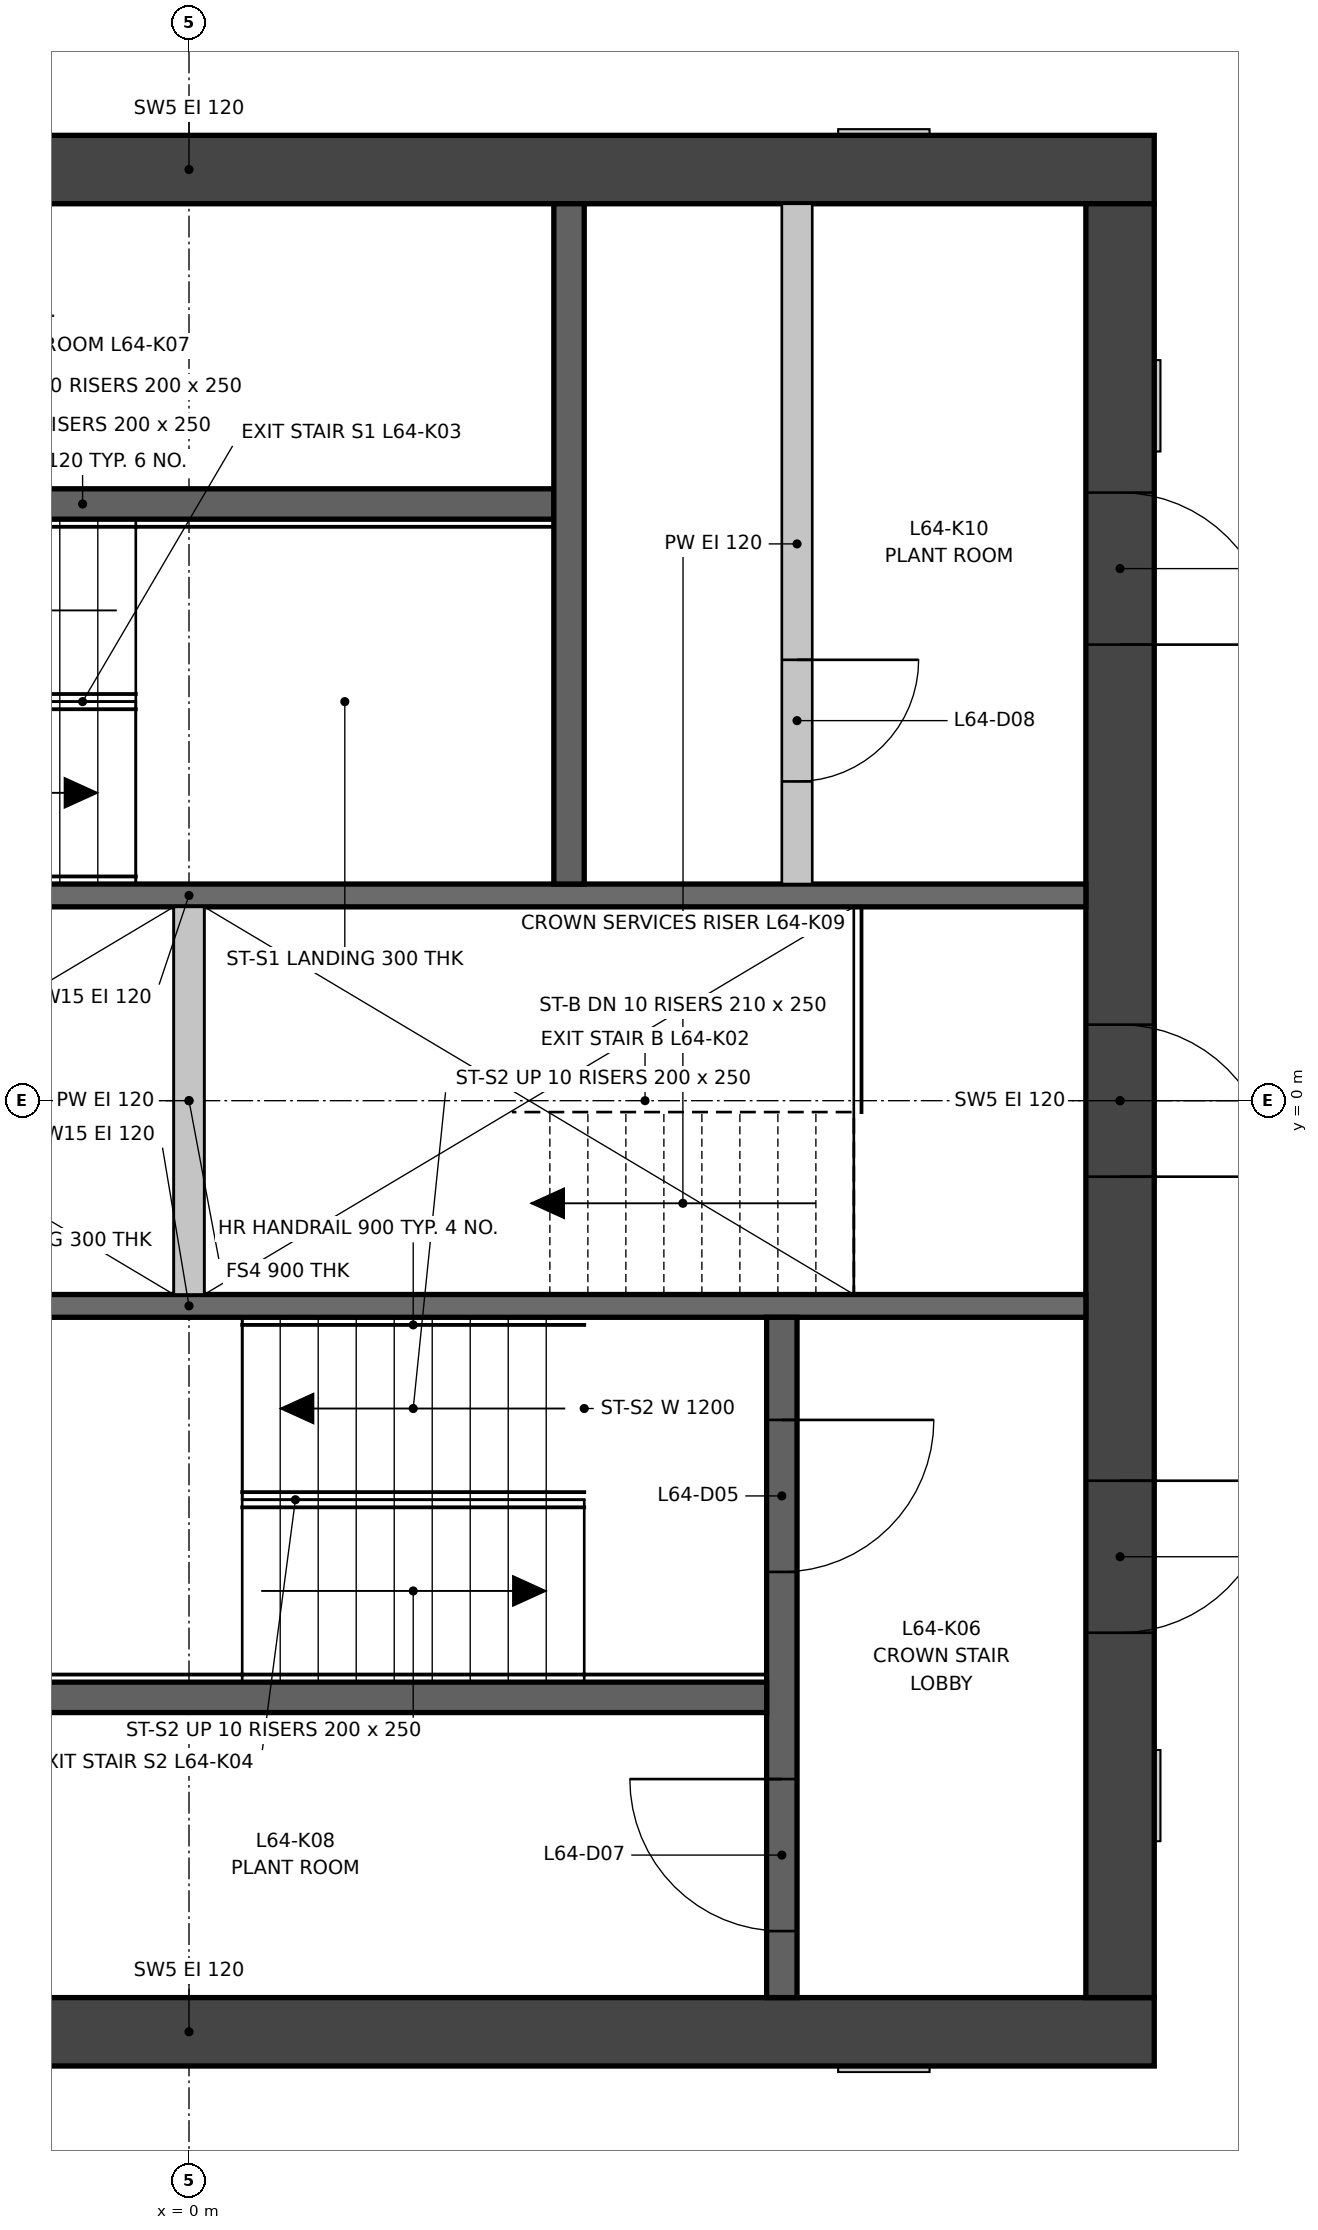
"""IFC4 building model, lengths in metres.
Left out: names, types, materials, properties, quantities, classifications, styles, units other than length and angle.
Written with IfcOpenShell. Run it as: python <this file> out.ifc"""

import sys

from ifc_helpers import new_model, si_unit, direction, frame, frame_2d, origin, place, context, subcontext, project, spatial, rectangle, extrude, element, fill, save


model = new_model("IFC4")
c1 = context("Model", 3, precision=1e-05, world=origin(), true_north=direction((0.0, 1.0)))
c2 = subcontext(c1, "Body", "Model", "MODEL_VIEW")
j1 = project(units=[si_unit("LENGTHUNIT", "METRE"), si_unit("PLANEANGLEUNIT", "RADIAN")], contexts=[c1])
p1 = place(None, origin())
s1 = spatial("IfcSite", under=j1, at=p1, CompositionType="ELEMENT")
p2 = place(p1, origin())
s2 = spatial("IfcBuilding", under=s1, at=p2, CompositionType="ELEMENT")
p3 = place(p2, frame((0.0, 0.0, 235.4)))
s3 = spatial("IfcBuildingStorey", under=s2, at=p3, CompositionType="ELEMENT", Elevation=235.4)
for number, where, z_axis, x_axis in (
    (1, (-6.35, -6.125, 0.0), (0.0, 0.0, 1.0), (1.0, 0.0, 0.0)),
    (2, (-6.35, 6.125, 0.0), (0.0, 0.0, 1.0), (1.0, 0.0, 0.0)),
):
    element("IfcWall", number, at=place(p3, frame(where, z_axis=z_axis, x_axis=x_axis)), inside=s3, PredefinedType="SHEAR", context=c2, shape_type="SweptSolid", body=[
        extrude(rectangle(XDim=12.7, YDim=0.45, at=frame_2d((6.35, 0.0))), origin(), (0.0, 0.0, 1.0), 3.4),
    ])
p4 = place(p3, frame((6.125, -5.9, 0.0), z_axis=(0.0, 0.0, 1.0), x_axis=(0.0, 1.0, 0.0)))
e3 = element("IfcWall", 3, at=p4, inside=s3, PredefinedType="SHEAR", context=c2, shape_type="SweptSolid", body=[
    extrude(rectangle(XDim=11.8, YDim=0.45, at=frame_2d((5.9, 0.0))), origin(), (0.0, 0.0, 1.0), 3.4),
])
p5 = place(p4, frame((5.4, 0.0, 0.0)))
e4 = element("IfcOpeningElement", 4, at=p5, cuts=e3, PredefinedType="OPENING", context=c2, shape_type="SweptSolid", body=[
    extrude(rectangle(XDim=1.0, YDim=2.1, at=frame_2d((0.5, 1.05))), frame((0.0, 0.235, 0.0), z_axis=(0.0, -1.0, 0.0), x_axis=(1.0, 0.0, 0.0)), (0.0, 0.0, 1.0), 0.47),
])
p6 = place(p4, frame((2.4, 0.0, 0.0)))
e5 = element("IfcOpeningElement", 5, at=p6, cuts=e3, PredefinedType="OPENING", context=c2, shape_type="SweptSolid", body=[
    extrude(rectangle(XDim=1.0, YDim=2.1, at=frame_2d((0.5, 1.05))), frame((0.0, 0.235, 0.0), z_axis=(0.0, -1.0, 0.0), x_axis=(1.0, 0.0, 0.0)), (0.0, 0.0, 1.0), 0.47),
])
p7 = place(p4, frame((8.9, 0.0, 0.0)))
e6 = element("IfcOpeningElement", 6, at=p7, cuts=e3, PredefinedType="OPENING", context=c2, shape_type="SweptSolid", body=[
    extrude(rectangle(XDim=1.0, YDim=2.1, at=frame_2d((0.5, 1.05))), frame((0.0, 0.235, 0.0), z_axis=(0.0, -1.0, 0.0), x_axis=(1.0, 0.0, 0.0)), (0.0, 0.0, 1.0), 0.47),
])
p8 = place(p3, frame((-5.9, -1.35, 0.0), z_axis=(0.0, 0.0, 1.0), x_axis=(1.0, 0.0, 0.0)))
e7 = element("IfcWall", 7, at=p8, inside=s3, PredefinedType="SHEAR", context=c2, shape_type="SweptSolid", body=[
    extrude(rectangle(XDim=11.8, YDim=0.15, at=frame_2d((5.9, 0.0))), origin(), (0.0, 0.0, 1.0), 3.4),
])
p9 = place(p8, frame((0.45, 0.0, 0.0)))
e8 = element("IfcOpeningElement", 8, at=p9, cuts=e7, PredefinedType="OPENING", context=c2, shape_type="SweptSolid", body=[
    extrude(rectangle(XDim=1.0, YDim=2.1, at=frame_2d((0.5, 1.05))), frame((0.0, 0.085, 0.0), z_axis=(0.0, -1.0, 0.0), x_axis=(1.0, 0.0, 0.0)), (0.0, 0.0, 1.0), 0.17),
])
p10 = place(p3, frame((-5.9, 1.35, 0.0), z_axis=(0.0, 0.0, 1.0), x_axis=(1.0, 0.0, 0.0)))
e9 = element("IfcWall", 9, at=p10, inside=s3, PredefinedType="SHEAR", context=c2, shape_type="SweptSolid", body=[
    extrude(rectangle(XDim=11.8, YDim=0.15, at=frame_2d((5.9, 0.0))), origin(), (0.0, 0.0, 1.0), 3.4),
])
p11 = place(p3, frame((0.0, -1.275, 0.0), z_axis=(0.0, 0.0, 1.0), x_axis=(0.0, 1.0, 0.0)))
e10 = element("IfcWall", 10, at=p11, inside=s3, PredefinedType="PARTITIONING", context=c2, shape_type="SweptSolid", body=[
    extrude(rectangle(XDim=2.55, YDim=0.2, at=frame_2d((1.275, 0.0))), origin(), (0.0, 0.0, 1.0), 3.4),
])
p12 = place(p3, frame((-3.8, 3.925, 0.0), z_axis=(0.0, 0.0, 1.0), x_axis=(1.0, 0.0, 0.0)))
e11 = element("IfcWall", 11, at=p12, inside=s3, PredefinedType="SHEAR", context=c2, shape_type="SweptSolid", body=[
    extrude(rectangle(XDim=6.2, YDim=0.2, at=frame_2d((3.1, 0.0))), origin(), (0.0, 0.0, 1.0), 3.4),
])
p13 = place(p3, frame((2.5, 1.425, 0.0), z_axis=(0.0, 0.0, 1.0), x_axis=(0.0, 1.0, 0.0)))
e12 = element("IfcWall", 12, at=p13, inside=s3, PredefinedType="SHEAR", context=c2, shape_type="SweptSolid", body=[
    extrude(rectangle(XDim=4.475, YDim=0.2, at=frame_2d((2.237, 0.0))), origin(), (0.0, 0.0, 1.0), 3.4),
])
p14 = place(p3, frame((3.9, -1.425, 0.0), z_axis=(0.0, 0.0, 1.0), x_axis=(0.0, -1.0, 0.0)))
e13 = element("IfcWall", 13, at=p14, inside=s3, PredefinedType="SHEAR", context=c2, shape_type="SweptSolid", body=[
    extrude(rectangle(XDim=4.475, YDim=0.2, at=frame_2d((2.237, 0.0))), origin(), (0.0, 0.0, 1.0), 3.4),
])
p15 = place(p14, frame((0.675, 0.0, 0.0)))
e14 = element("IfcOpeningElement", 14, at=p15, cuts=e13, PredefinedType="OPENING", context=c2, shape_type="SweptSolid", body=[
    extrude(rectangle(XDim=1.0, YDim=2.1, at=frame_2d((0.5, 1.05))), frame((0.0, 0.11, 0.0), z_axis=(0.0, -1.0, 0.0), x_axis=(1.0, 0.0, 0.0)), (0.0, 0.0, 1.0), 0.22),
])
p16 = place(p14, frame((3.038, 0.0, 0.0)))
e15 = element("IfcOpeningElement", 15, at=p16, cuts=e13, PredefinedType="OPENING", context=c2, shape_type="SweptSolid", body=[
    extrude(rectangle(XDim=1.0, YDim=2.1, at=frame_2d((0.5, 1.05))), frame((0.0, 0.11, 0.0), z_axis=(0.0, -1.0, 0.0), x_axis=(1.0, 0.0, 0.0)), (0.0, 0.0, 1.0), 0.22),
])
p17 = place(p3, frame((3.8, -3.925, 0.0), z_axis=(0.0, 0.0, 1.0), x_axis=(-1.0, 0.0, 0.0)))
e16 = element("IfcWall", 16, at=p17, inside=s3, PredefinedType="SHEAR", context=c2, shape_type="SweptSolid", body=[
    extrude(rectangle(XDim=6.2, YDim=0.2, at=frame_2d((3.1, 0.0))), origin(), (0.0, 0.0, 1.0), 3.4),
])
p18 = place(p3, frame((4.0, 1.425, 0.0), z_axis=(0.0, 0.0, 1.0), x_axis=(0.0, 1.0, 0.0)))
e17 = element("IfcWall", 17, at=p18, inside=s3, PredefinedType="PARTITIONING", context=c2, shape_type="SweptSolid", body=[
    extrude(rectangle(XDim=4.475, YDim=0.2, at=frame_2d((2.237, 0.0))), origin(), (0.0, 0.0, 1.0), 3.4),
])
p19 = place(p18, frame((0.675, 0.0, 0.0)))
e18 = element("IfcOpeningElement", 18, at=p19, cuts=e17, PredefinedType="OPENING", context=c2, shape_type="SweptSolid", body=[
    extrude(rectangle(XDim=0.8, YDim=2.1, at=frame_2d((0.4, 1.05))), frame((0.0, 0.11, 0.0), z_axis=(0.0, -1.0, 0.0), x_axis=(1.0, 0.0, 0.0)), (0.0, 0.0, 1.0), 0.22),
])
p20 = place(p15, origin())
e19 = element("IfcDoor", 19, at=p20, inside=s3, OperationType="SINGLE_SWING_LEFT", PredefinedType="DOOR", context=c2, shape_type="SweptSolid", body=[
    extrude(rectangle(XDim=1.0, YDim=2.1, at=frame_2d((0.5, 1.05))), frame((0.0, 0.025, 0.0), z_axis=(0.0, -1.0, 0.0), x_axis=(1.0, 0.0, 0.0)), (0.0, 0.0, 1.0), 0.05),
])
fill(e14, e19)
p21 = place(p16, frame((1.0, 0.0, 0.0), z_axis=(0.0, 0.0, 1.0), x_axis=(-1.0, 0.0, 0.0)))
e20 = element("IfcDoor", 20, at=p21, inside=s3, OperationType="SINGLE_SWING_LEFT", PredefinedType="DOOR", context=c2, shape_type="SweptSolid", body=[
    extrude(rectangle(XDim=1.0, YDim=2.1, at=frame_2d((0.5, 1.05))), frame((0.0, 0.025, 0.0), z_axis=(0.0, -1.0, 0.0), x_axis=(1.0, 0.0, 0.0)), (0.0, 0.0, 1.0), 0.05),
])
fill(e15, e20)
p22 = place(p19, frame((0.8, 0.0, 0.0), z_axis=(0.0, 0.0, 1.0), x_axis=(-1.0, 0.0, 0.0)))
e21 = element("IfcDoor", 21, at=p22, inside=s3, OperationType="SINGLE_SWING_RIGHT", PredefinedType="DOOR", context=c2, shape_type="SweptSolid", body=[
    extrude(rectangle(XDim=0.8, YDim=2.1, at=frame_2d((0.4, 1.05))), frame((0.0, 0.025, 0.0), z_axis=(0.0, -1.0, 0.0), x_axis=(1.0, 0.0, 0.0)), (0.0, 0.0, 1.0), 0.05),
])
fill(e18, e21)
p23 = place(p5, frame((1.0, 0.0, 0.0), z_axis=(0.0, 0.0, 1.0), x_axis=(-1.0, 0.0, 0.0)))
e22 = element("IfcDoor", 22, at=p23, inside=s3, OperationType="SINGLE_SWING_LEFT", PredefinedType="DOOR", context=c2, shape_type="SweptSolid", body=[
    extrude(rectangle(XDim=1.0, YDim=2.1, at=frame_2d((0.5, 1.05))), frame((0.0, 0.025, 0.0), z_axis=(0.0, -1.0, 0.0), x_axis=(1.0, 0.0, 0.0)), (0.0, 0.0, 1.0), 0.05),
])
fill(e4, e22)
p24 = place(p6, frame((1.0, 0.0, 0.0), z_axis=(0.0, 0.0, 1.0), x_axis=(-1.0, 0.0, 0.0)))
e23 = element("IfcDoor", 23, at=p24, inside=s3, OperationType="SINGLE_SWING_RIGHT", PredefinedType="DOOR", context=c2, shape_type="SweptSolid", body=[
    extrude(rectangle(XDim=1.0, YDim=2.1, at=frame_2d((0.5, 1.05))), frame((0.0, 0.025, 0.0), z_axis=(0.0, -1.0, 0.0), x_axis=(1.0, 0.0, 0.0)), (0.0, 0.0, 1.0), 0.05),
])
fill(e5, e23)
p25 = place(p7, frame((1.0, 0.0, 0.0), z_axis=(0.0, 0.0, 1.0), x_axis=(-1.0, 0.0, 0.0)))
e24 = element("IfcDoor", 24, at=p25, inside=s3, OperationType="SINGLE_SWING_LEFT", PredefinedType="DOOR", context=c2, shape_type="SweptSolid", body=[
    extrude(rectangle(XDim=1.0, YDim=2.1, at=frame_2d((0.5, 1.05))), frame((0.0, 0.025, 0.0), z_axis=(0.0, -1.0, 0.0), x_axis=(1.0, 0.0, 0.0)), (0.0, 0.0, 1.0), 0.05),
])
fill(e6, e24)
save(model, sys.argv[1])
